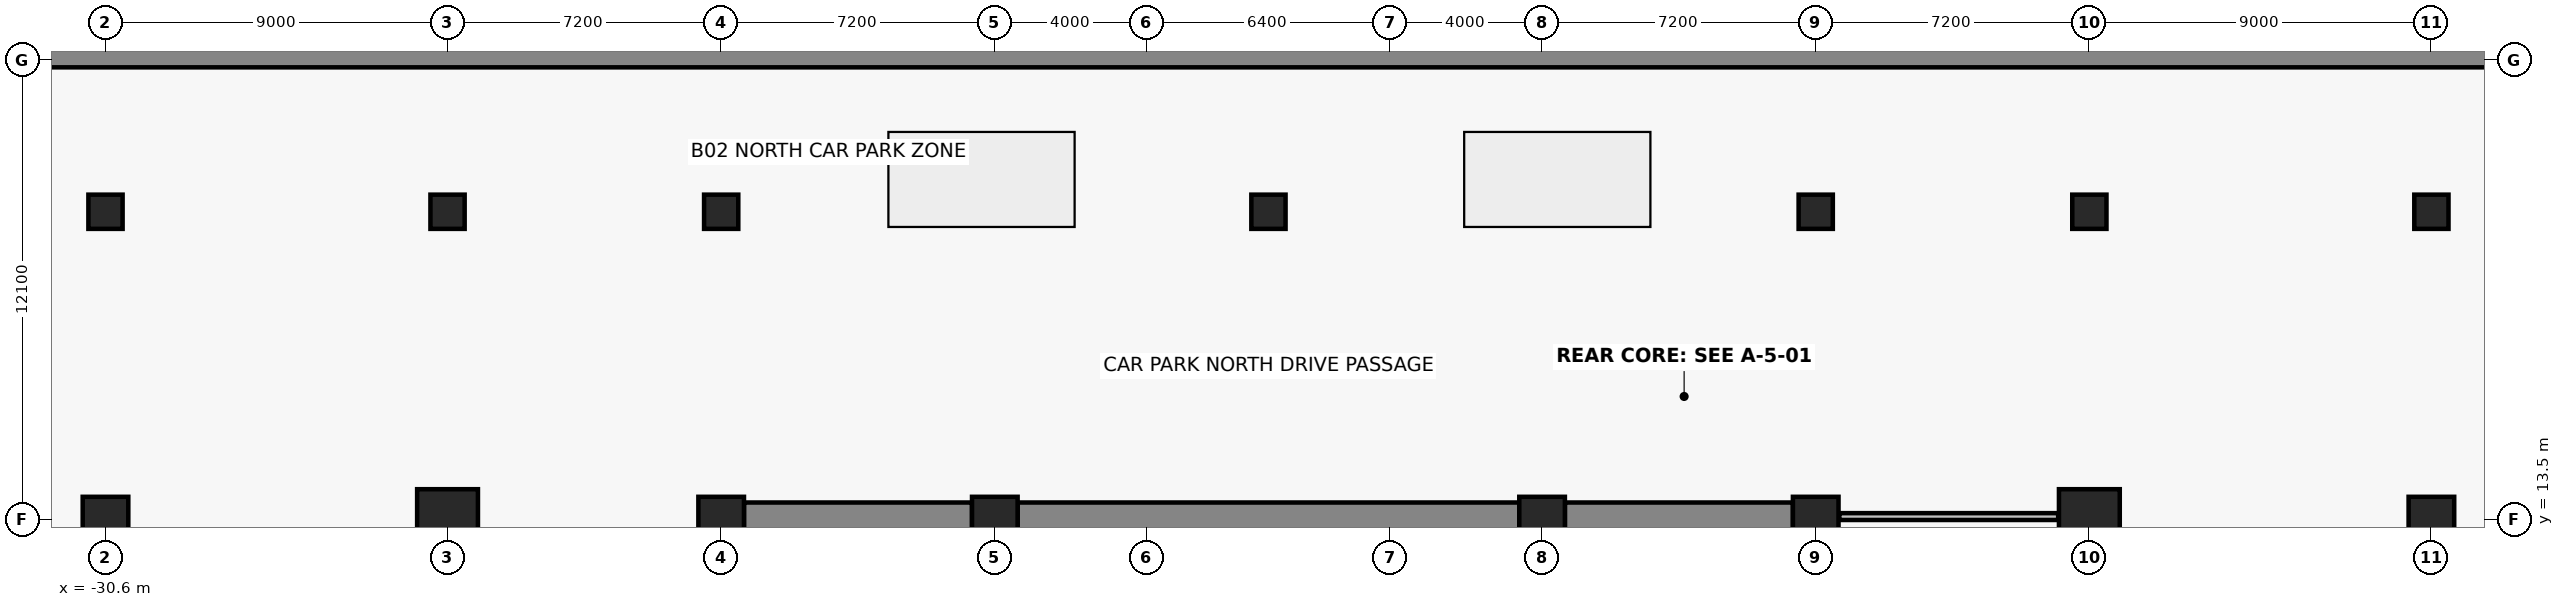
"""IFC4 building model, lengths in metres.
Left out: names, types, materials, properties, quantities, classifications, styles, units other than length and angle.
Written with IfcOpenShell. Run it as: python <this file> out.ifc"""

import sys

from ifc_helpers import new_model, si_unit, direction, frame, frame_2d, origin, origin_2d, place, context, subcontext, project, spatial, rectangle, extrude, element, save


model = new_model("IFC4")
c1 = context("Model", 3, precision=1e-05, world=origin(), true_north=direction((0.0, 1.0)))
c2 = subcontext(c1, "Body", "Model", "MODEL_VIEW")
j1 = project(units=[si_unit("LENGTHUNIT", "METRE"), si_unit("PLANEANGLEUNIT", "RADIAN")], contexts=[c1])
p1 = place(None, origin())
s1 = spatial("IfcSite", under=j1, at=p1, CompositionType="ELEMENT")
p2 = place(p1, origin())
s2 = spatial("IfcBuilding", under=s1, at=p2, CompositionType="ELEMENT")
p3 = place(p2, frame((0.0, 0.0, -8.8)))
s3 = spatial("IfcBuildingStorey", under=s2, at=p3, CompositionType="ELEMENT", Elevation=-8.8)
p4 = place(p3, frame((-37.0, 25.8, 0.0), z_axis=(0.0, 0.0, 1.0), x_axis=(1.0, 0.0, 0.0)))
e1 = element("IfcWall", 1, at=p4, inside=s3, PredefinedType="USERDEFINED", context=c2, shape_type="SweptSolid", body=[
    extrude(rectangle(XDim=74.0, YDim=0.8, at=frame_2d((37.0, 0.0))), origin(), (0.0, 0.0, 1.0), 4.12),
])
for number, where, z_axis, x_axis in (
    (2, (-14.4, 13.5, 0.0), (0.0, 0.0, 1.0), (1.0, 0.0, 0.0)),
    (3, (-7.2, 13.5, 0.0), (0.0, 0.0, 1.0), (1.0, 0.0, 0.0)),
    (4, (7.2, 13.5, 0.0), (0.0, 0.0, 1.0), (1.0, 0.0, 0.0)),
    (5, (14.4, 13.5, 0.0), (0.0, 0.0, 1.0), (1.0, 0.0, 0.0)),
):
    element("IfcColumn", number, at=place(p3, frame(where, z_axis=z_axis, x_axis=x_axis)), inside=s3, PredefinedType="COLUMN", context=c2, shape_type="SweptSolid", body=[
        extrude(rectangle(XDim=1.2, YDim=1.2, at=origin_2d()), origin(), (0.0, 0.0, 1.0), 4.4),
    ])
for number, where, z_axis, x_axis in (
    (6, (-21.6, 13.5, 0.0), (0.0, 0.0, 1.0), (1.0, 0.0, 0.0)),
    (7, (21.6, 13.5, 0.0), (0.0, 0.0, 1.0), (1.0, 0.0, 0.0)),
):
    element("IfcColumn", number, at=place(p3, frame(where, z_axis=z_axis, x_axis=x_axis)), inside=s3, PredefinedType="COLUMN", context=c2, shape_type="SweptSolid", body=[
        extrude(rectangle(XDim=1.6, YDim=1.6, at=origin_2d()), origin(), (0.0, 0.0, 1.0), 4.4),
    ])
for number, where, z_axis, x_axis in (
    (8, (-30.6, 13.5, 0.0), (0.0, 0.0, 1.0), (1.0, 0.0, 0.0)),
    (9, (30.6, 13.5, 0.0), (0.0, 0.0, 1.0), (1.0, 0.0, 0.0)),
):
    element("IfcColumn", number, at=place(p3, frame(where, z_axis=z_axis, x_axis=x_axis)), inside=s3, PredefinedType="COLUMN", context=c2, shape_type="SweptSolid", body=[
        extrude(rectangle(XDim=1.2, YDim=1.2, at=origin_2d()), origin(), (0.0, 0.0, 1.0), 4.4),
    ])
for number, where, z_axis, x_axis in (
    (10, (-30.6, 21.6, 0.0), (0.0, 0.0, 1.0), (1.0, 0.0, 0.0)),
    (11, (30.6, 21.6, 0.0), (0.0, 0.0, 1.0), (1.0, 0.0, 0.0)),
    (12, (-21.6, 21.6, 0.0), (0.0, 0.0, 1.0), (1.0, 0.0, 0.0)),
    (13, (21.6, 21.6, 0.0), (0.0, 0.0, 1.0), (1.0, 0.0, 0.0)),
    (14, (-14.4, 21.6, 0.0), (0.0, 0.0, 1.0), (1.0, 0.0, 0.0)),
    (15, (0.0, 21.6, 0.0), (0.0, 0.0, 1.0), (1.0, 0.0, 0.0)),
    (16, (14.4, 21.6, 0.0), (0.0, 0.0, 1.0), (1.0, 0.0, 0.0)),
):
    element("IfcColumn", number, at=place(p3, frame(where, z_axis=z_axis, x_axis=x_axis)), inside=s3, PredefinedType="COLUMN", context=c2, shape_type="SweptSolid", body=[
        extrude(rectangle(XDim=0.9, YDim=0.9, at=origin_2d()), origin(), (0.0, 0.0, 1.0), 4.4),
    ])
p5 = place(p3, frame((-13.8, 13.5, 0.0), z_axis=(0.0, 0.0, 1.0), x_axis=(1.0, 0.0, 0.0)))
e17 = element("IfcWall", 17, at=p5, inside=s3, PredefinedType="SHEAR", context=c2, shape_type="SweptSolid", body=[
    extrude(rectangle(XDim=6.0, YDim=0.9, at=frame_2d((3.0, 0.0))), origin(), (0.0, 0.0, 1.0), 4.12),
])
p6 = place(p3, frame((-6.6, 13.5, 0.0), z_axis=(0.0, 0.0, 1.0), x_axis=(1.0, 0.0, 0.0)))
e18 = element("IfcWall", 18, at=p6, inside=s3, PredefinedType="SHEAR", context=c2, shape_type="SweptSolid", body=[
    extrude(rectangle(XDim=13.2, YDim=0.9, at=frame_2d((6.6, 0.0))), origin(), (0.0, 0.0, 1.0), 4.12),
])
p7 = place(p3, frame((7.8, 13.5, 0.0), z_axis=(0.0, 0.0, 1.0), x_axis=(1.0, 0.0, 0.0)))
e19 = element("IfcWall", 19, at=p7, inside=s3, PredefinedType="SHEAR", context=c2, shape_type="SweptSolid", body=[
    extrude(rectangle(XDim=6.0, YDim=0.9, at=frame_2d((3.0, 0.0))), origin(), (0.0, 0.0, 1.0), 4.12),
])
p8 = place(p3, frame((15.02, 13.58, 0.0), z_axis=(0.0, 0.0, 1.0), x_axis=(1.0, 0.0, 0.0)))
e20 = element("IfcWall", 20, at=p8, inside=s3, PredefinedType="PARTITIONING", context=c2, shape_type="SweptSolid", body=[
    extrude(rectangle(XDim=5.76, YDim=0.18, at=frame_2d((2.88, 0.0))), origin(), (0.0, 0.0, 1.0), 3.41),
])
save(model, sys.argv[1])
